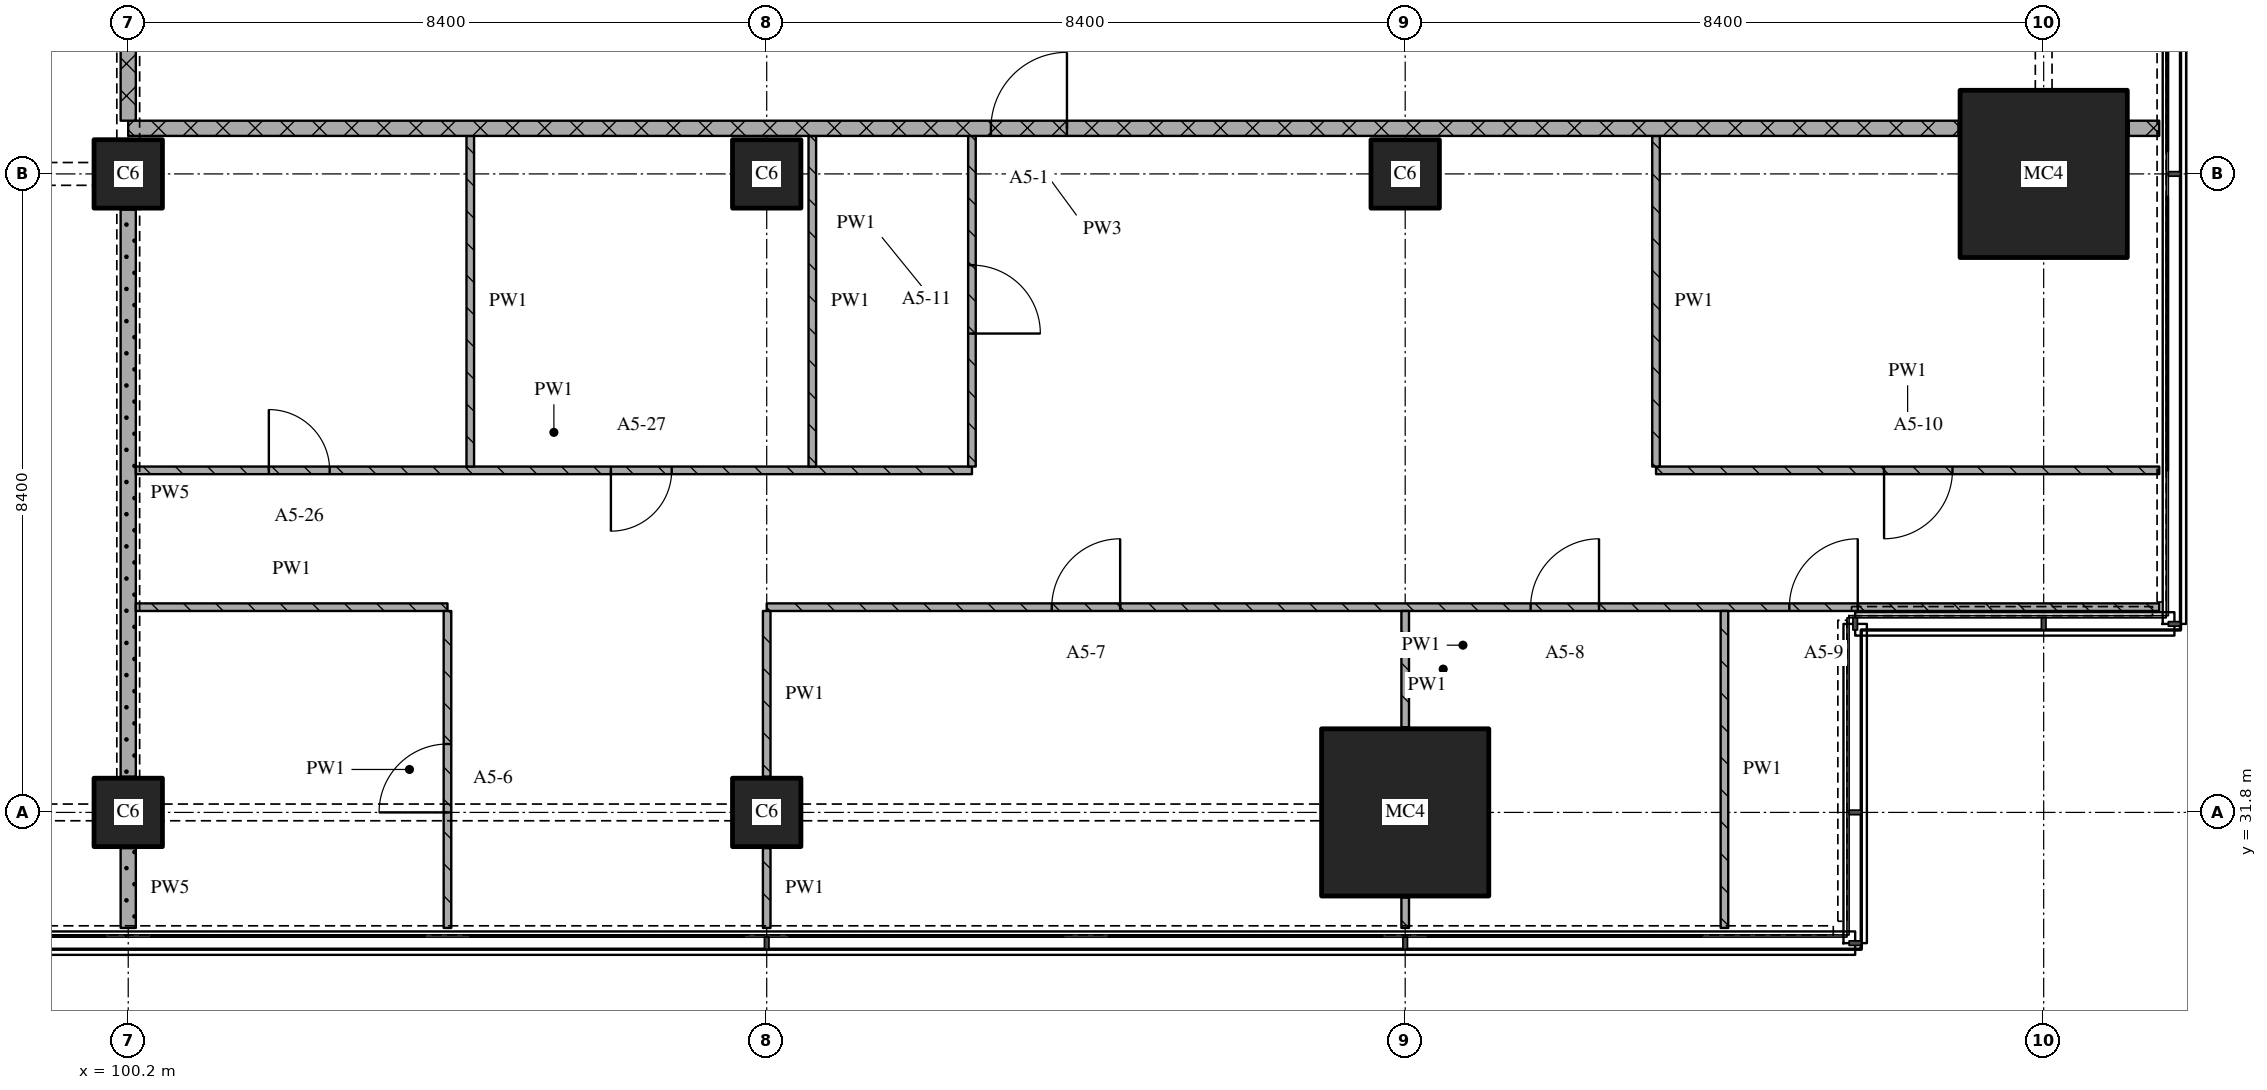
"""IFC4 building model, lengths in metres.
Left out: names, types, materials, properties, quantities, classifications, styles, units other than length and angle.
Written with IfcOpenShell. Run it as: python <this file> out.ifc"""

import sys

from ifc_helpers import new_model, si_unit, direction, frame, frame_2d, origin, origin_2d, place, context, subcontext, project, spatial, rectangle, extrude, element, fill, save


model = new_model("IFC4")
c1 = context("Model", 3, precision=1e-05, world=origin(), true_north=direction((0.0, 1.0)))
c2 = subcontext(c1, "Body", "Model", "MODEL_VIEW")
j1 = project(units=[si_unit("LENGTHUNIT", "METRE"), si_unit("PLANEANGLEUNIT", "RADIAN")], contexts=[c1])
p1 = place(None, origin())
s1 = spatial("IfcSite", under=j1, at=p1, CompositionType="ELEMENT")
p2 = place(p1, origin())
s2 = spatial("IfcBuilding", under=s1, at=p2, CompositionType="ELEMENT")
p3 = place(p2, frame((0.0, 0.0, 80.4)))
s3 = spatial("IfcBuildingStorey", under=s2, at=p3, CompositionType="ELEMENT", Elevation=80.4)
for number, where, z_axis, x_axis in (
    (1, (100.2, 31.8, 0.0), (0.0, 0.0, 1.0), (1.0, 0.0, 0.0)),
    (2, (100.2, 40.2, 0.0), (0.0, 0.0, 1.0), (1.0, 0.0, 0.0)),
    (3, (108.6, 31.8, 0.0), (0.0, 0.0, 1.0), (1.0, 0.0, 0.0)),
    (4, (108.6, 40.2, 0.0), (0.0, 0.0, 1.0), (1.0, 0.0, 0.0)),
):
    element("IfcColumn", number, at=place(p3, frame(where, z_axis=z_axis, x_axis=x_axis)), inside=s3, PredefinedType="COLUMN", context=c2, shape_type="SweptSolid", body=[
        extrude(rectangle(XDim=0.9, YDim=0.9, at=origin_2d()), origin(), (0.0, 0.0, 1.0), 3.6),
    ])
p4 = place(p3, frame((117.0, 31.8, 0.0), z_axis=(0.0, 0.0, 1.0), x_axis=(1.0, 0.0, 0.0)))
e5 = element("IfcColumn", 5, at=p4, inside=s3, PredefinedType="COLUMN", context=c2, shape_type="SweptSolid", body=[
    extrude(rectangle(XDim=2.2, YDim=2.2, at=origin_2d()), origin(), (0.0, 0.0, 1.0), 3.6),
])
p5 = place(p3, frame((117.0, 40.2, 0.0), z_axis=(0.0, 0.0, 1.0), x_axis=(1.0, 0.0, 0.0)))
e6 = element("IfcColumn", 6, at=p5, inside=s3, PredefinedType="COLUMN", context=c2, shape_type="SweptSolid", body=[
    extrude(rectangle(XDim=0.9, YDim=0.9, at=origin_2d()), origin(), (0.0, 0.0, 1.0), 3.6),
])
p6 = place(p3, frame((125.4, 40.2, 0.0), z_axis=(0.0, 0.0, 1.0), x_axis=(1.0, 0.0, 0.0)))
e7 = element("IfcColumn", 7, at=p6, inside=s3, PredefinedType="COLUMN", context=c2, shape_type="SweptSolid", body=[
    extrude(rectangle(XDim=2.2, YDim=2.2, at=origin_2d()), origin(), (0.0, 0.0, 1.0), 3.6),
])
p7 = place(p3, frame((100.3, 34.5, 0.0), z_axis=(0.0, 0.0, 1.0), x_axis=(1.0, 0.0, 0.0)))
e8 = element("IfcWall", 8, at=p7, inside=s3, PredefinedType="PARTITIONING", context=c2, shape_type="SweptSolid", body=[
    extrude(rectangle(XDim=4.1, YDim=0.1, at=frame_2d((2.05, 0.0))), origin(), (0.0, 0.0, 1.0), 3.3),
])
p8 = place(p3, frame((126.92, 34.5, 0.0), z_axis=(0.0, 0.0, 1.0), x_axis=(-1.0, 0.0, 0.0)))
e9 = element("IfcWall", 9, at=p8, inside=s3, PredefinedType="PARTITIONING", context=c2, shape_type="SweptSolid", body=[
    extrude(rectangle(XDim=18.32, YDim=0.1, at=frame_2d((9.16, 0.0))), origin(), (0.0, 0.0, 1.0), 3.3),
])
p9 = place(p8, frame((3.966, 0.0, 0.0)))
e10 = element("IfcOpeningElement", 10, at=p9, cuts=e9, PredefinedType="OPENING", context=c2, shape_type="SweptSolid", body=[
    extrude(rectangle(XDim=0.9, YDim=2.1, at=frame_2d((0.45, 1.05))), frame((0.0, 0.06, 0.0), z_axis=(0.0, -1.0, 0.0), x_axis=(1.0, 0.0, 0.0)), (0.0, 0.0, 1.0), 0.12),
])
p10 = place(p8, frame((7.37, 0.0, 0.0)))
e11 = element("IfcOpeningElement", 11, at=p10, cuts=e9, PredefinedType="OPENING", context=c2, shape_type="SweptSolid", body=[
    extrude(rectangle(XDim=0.9, YDim=2.1, at=frame_2d((0.45, 1.05))), frame((0.0, 0.06, 0.0), z_axis=(0.0, -1.0, 0.0), x_axis=(1.0, 0.0, 0.0)), (0.0, 0.0, 1.0), 0.12),
])
p11 = place(p8, frame((13.67, 0.0, 0.0)))
e12 = element("IfcOpeningElement", 12, at=p11, cuts=e9, PredefinedType="OPENING", context=c2, shape_type="SweptSolid", body=[
    extrude(rectangle(XDim=0.9, YDim=2.1, at=frame_2d((0.45, 1.05))), frame((0.0, 0.06, 0.0), z_axis=(0.0, -1.0, 0.0), x_axis=(1.0, 0.0, 0.0)), (0.0, 0.0, 1.0), 0.12),
])
p12 = place(p3, frame((100.3, 36.3, 0.0), z_axis=(0.0, 0.0, 1.0), x_axis=(1.0, 0.0, 0.0)))
e13 = element("IfcWall", 13, at=p12, inside=s3, PredefinedType="PARTITIONING", context=c2, shape_type="SweptSolid", body=[
    extrude(rectangle(XDim=11.0, YDim=0.1, at=frame_2d((5.5, 0.0))), origin(), (0.0, 0.0, 1.0), 3.3),
])
p13 = place(p12, frame((1.75, 0.0, 0.0)))
e14 = element("IfcOpeningElement", 14, at=p13, cuts=e13, PredefinedType="OPENING", context=c2, shape_type="SweptSolid", body=[
    extrude(rectangle(XDim=0.8, YDim=2.1, at=frame_2d((0.4, 1.05))), frame((0.0, 0.06, 0.0), z_axis=(0.0, -1.0, 0.0), x_axis=(1.0, 0.0, 0.0)), (0.0, 0.0, 1.0), 0.12),
])
p14 = place(p12, frame((6.25, 0.0, 0.0)))
e15 = element("IfcOpeningElement", 15, at=p14, cuts=e13, PredefinedType="OPENING", context=c2, shape_type="SweptSolid", body=[
    extrude(rectangle(XDim=0.8, YDim=2.1, at=frame_2d((0.4, 1.05))), frame((0.0, 0.06, 0.0), z_axis=(0.0, -1.0, 0.0), x_axis=(1.0, 0.0, 0.0)), (0.0, 0.0, 1.0), 0.12),
])
p15 = place(p3, frame((120.3, 36.3, 0.0), z_axis=(0.0, 0.0, 1.0), x_axis=(1.0, 0.0, 0.0)))
e16 = element("IfcWall", 16, at=p15, inside=s3, PredefinedType="PARTITIONING", context=c2, shape_type="SweptSolid", body=[
    extrude(rectangle(XDim=6.62, YDim=0.1, at=frame_2d((3.31, 0.0))), origin(), (0.0, 0.0, 1.0), 3.3),
])
p16 = place(p15, frame((3.0, 0.0, 0.0)))
e17 = element("IfcOpeningElement", 17, at=p16, cuts=e16, PredefinedType="OPENING", context=c2, shape_type="SweptSolid", body=[
    extrude(rectangle(XDim=0.9, YDim=2.1, at=frame_2d((0.45, 1.05))), frame((0.0, 0.06, 0.0), z_axis=(0.0, -1.0, 0.0), x_axis=(1.0, 0.0, 0.0)), (0.0, 0.0, 1.0), 0.12),
])
p17 = place(p3, frame((124.28, 40.8, 0.0), z_axis=(0.0, 0.0, 1.0), x_axis=(-1.0, 0.0, 0.0)))
e18 = element("IfcWall", 18, at=p17, inside=s3, PredefinedType="PARTITIONING", context=c2, shape_type="SweptSolid", body=[
    extrude(rectangle(XDim=24.08, YDim=0.2, at=frame_2d((12.04, 0.0))), origin(), (0.0, 0.0, 1.0), 3.3),
])
p18 = place(p17, frame((11.73, 0.0, 0.0)))
e19 = element("IfcOpeningElement", 19, at=p18, cuts=e18, PredefinedType="OPENING", context=c2, shape_type="SweptSolid", body=[
    extrude(rectangle(XDim=1.0, YDim=2.1, at=frame_2d((0.5, 1.05))), frame((0.0, 0.11, 0.0), z_axis=(0.0, -1.0, 0.0), x_axis=(1.0, 0.0, 0.0)), (0.0, 0.0, 1.0), 0.22),
])
p19 = place(p3, frame((126.52, 40.8, 0.0), z_axis=(0.0, 0.0, 1.0), x_axis=(1.0, 0.0, 0.0)))
e20 = element("IfcWall", 20, at=p19, inside=s3, PredefinedType="PARTITIONING", context=c2, shape_type="SweptSolid", body=[
    extrude(rectangle(XDim=0.4, YDim=0.2, at=frame_2d((0.2, 0.0))), origin(), (0.0, 0.0, 1.0), 3.3),
])
p20 = place(p3, frame((100.2, 43.1, 0.0), z_axis=(0.0, 0.0, 1.0), x_axis=(0.0, -1.0, 0.0)))
e21 = element("IfcWall", 21, at=p20, inside=s3, PredefinedType="PARTITIONING", context=c2, shape_type="SweptSolid", body=[
    extrude(rectangle(XDim=2.2, YDim=0.2, at=frame_2d((1.1, 0.0))), origin(), (0.0, 0.0, 1.0), 2.41),
])
p21 = place(p3, frame((100.2, 31.33, 0.0), z_axis=(0.0, 0.0, 1.0), x_axis=(0.0, -1.0, 0.0)))
e22 = element("IfcWall", 22, at=p21, inside=s3, PredefinedType="PARTITIONING", context=c2, shape_type="SweptSolid", body=[
    extrude(rectangle(XDim=1.05, YDim=0.2, at=frame_2d((0.525, 0.0))), origin(), (0.0, 0.0, 1.0), 2.41),
])
p22 = place(p3, frame((100.2, 39.73, 0.0), z_axis=(0.0, 0.0, 1.0), x_axis=(0.0, -1.0, 0.0)))
e23 = element("IfcWall", 23, at=p22, inside=s3, PredefinedType="PARTITIONING", context=c2, shape_type="SweptSolid", body=[
    extrude(rectangle(XDim=7.46, YDim=0.2, at=frame_2d((3.73, 0.0))), origin(), (0.0, 0.0, 1.0), 2.81),
])
p23 = place(p3, frame((104.4, 30.28, 0.0), z_axis=(0.0, 0.0, 1.0), x_axis=(0.0, 1.0, 0.0)))
e24 = element("IfcWall", 24, at=p23, inside=s3, PredefinedType="PARTITIONING", context=c2, shape_type="SweptSolid", body=[
    extrude(rectangle(XDim=4.17, YDim=0.1, at=frame_2d((2.085, 0.0))), origin(), (0.0, 0.0, 1.0), 3.3),
])
p24 = place(p23, frame((1.52, 0.0, 0.0)))
e25 = element("IfcOpeningElement", 25, at=p24, cuts=e24, PredefinedType="OPENING", context=c2, shape_type="SweptSolid", body=[
    extrude(rectangle(XDim=0.9, YDim=2.1, at=frame_2d((0.45, 1.05))), frame((0.0, 0.06, 0.0), z_axis=(0.0, -1.0, 0.0), x_axis=(1.0, 0.0, 0.0)), (0.0, 0.0, 1.0), 0.12),
])
p25 = place(p3, frame((104.7, 40.7, 0.0), z_axis=(0.0, 0.0, 1.0), x_axis=(0.0, -1.0, 0.0)))
e26 = element("IfcWall", 26, at=p25, inside=s3, PredefinedType="PARTITIONING", context=c2, shape_type="SweptSolid", body=[
    extrude(rectangle(XDim=4.35, YDim=0.1, at=frame_2d((2.175, 0.0))), origin(), (0.0, 0.0, 1.0), 3.3),
])
p26 = place(p3, frame((108.6, 31.33, 0.0), z_axis=(0.0, 0.0, 1.0), x_axis=(0.0, -1.0, 0.0)))
e27 = element("IfcWall", 27, at=p26, inside=s3, PredefinedType="PARTITIONING", context=c2, shape_type="SweptSolid", body=[
    extrude(rectangle(XDim=1.05, YDim=0.1, at=frame_2d((0.525, 0.0))), origin(), (0.0, 0.0, 1.0), 3.3),
])
p27 = place(p3, frame((108.6, 34.45, 0.0), z_axis=(0.0, 0.0, 1.0), x_axis=(0.0, -1.0, 0.0)))
e28 = element("IfcWall", 28, at=p27, inside=s3, PredefinedType="PARTITIONING", context=c2, shape_type="SweptSolid", body=[
    extrude(rectangle(XDim=2.18, YDim=0.1, at=frame_2d((1.09, 0.0))), origin(), (0.0, 0.0, 1.0), 3.3),
])
p28 = place(p3, frame((109.2, 40.7, 0.0), z_axis=(0.0, 0.0, 1.0), x_axis=(0.0, -1.0, 0.0)))
e29 = element("IfcWall", 29, at=p28, inside=s3, PredefinedType="PARTITIONING", context=c2, shape_type="SweptSolid", body=[
    extrude(rectangle(XDim=4.35, YDim=0.1, at=frame_2d((2.175, 0.0))), origin(), (0.0, 0.0, 1.0), 3.3),
])
p29 = place(p3, frame((111.3, 36.35, 0.0), z_axis=(0.0, 0.0, 1.0), x_axis=(0.0, 1.0, 0.0)))
e30 = element("IfcWall", 30, at=p29, inside=s3, PredefinedType="PARTITIONING", context=c2, shape_type="SweptSolid", body=[
    extrude(rectangle(XDim=4.35, YDim=0.1, at=frame_2d((2.175, 0.0))), origin(), (0.0, 0.0, 1.0), 3.3),
])
p30 = place(p29, frame((1.75, 0.0, 0.0)))
e31 = element("IfcOpeningElement", 31, at=p30, cuts=e30, PredefinedType="OPENING", context=c2, shape_type="SweptSolid", body=[
    extrude(rectangle(XDim=0.9, YDim=2.1, at=frame_2d((0.45, 1.05))), frame((0.0, 0.06, 0.0), z_axis=(0.0, -1.0, 0.0), x_axis=(1.0, 0.0, 0.0)), (0.0, 0.0, 1.0), 0.12),
])
p31 = place(p3, frame((117.0, 30.68, 0.0), z_axis=(0.0, 0.0, 1.0), x_axis=(0.0, -1.0, 0.0)))
e32 = element("IfcWall", 32, at=p31, inside=s3, PredefinedType="PARTITIONING", context=c2, shape_type="SweptSolid", body=[
    extrude(rectangle(XDim=0.4, YDim=0.1, at=frame_2d((0.2, 0.0))), origin(), (0.0, 0.0, 1.0), 3.3),
])
p32 = place(p3, frame((117.0, 34.45, 0.0), z_axis=(0.0, 0.0, 1.0), x_axis=(0.0, -1.0, 0.0)))
e33 = element("IfcWall", 33, at=p32, inside=s3, PredefinedType="PARTITIONING", context=c2, shape_type="SweptSolid", body=[
    extrude(rectangle(XDim=1.53, YDim=0.1, at=frame_2d((0.765, 0.0))), origin(), (0.0, 0.0, 1.0), 3.3),
])
p33 = place(p3, frame((120.3, 40.7, 0.0), z_axis=(0.0, 0.0, 1.0), x_axis=(0.0, -1.0, 0.0)))
e34 = element("IfcWall", 34, at=p33, inside=s3, PredefinedType="PARTITIONING", context=c2, shape_type="SweptSolid", body=[
    extrude(rectangle(XDim=4.35, YDim=0.1, at=frame_2d((2.175, 0.0))), origin(), (0.0, 0.0, 1.0), 3.3),
])
p34 = place(p3, frame((121.2, 34.45, 0.0), z_axis=(0.0, 0.0, 1.0), x_axis=(0.0, -1.0, 0.0)))
e35 = element("IfcWall", 35, at=p34, inside=s3, PredefinedType="PARTITIONING", context=c2, shape_type="SweptSolid", body=[
    extrude(rectangle(XDim=4.17, YDim=0.1, at=frame_2d((2.085, 0.0))), origin(), (0.0, 0.0, 1.0), 3.3),
])
p35 = place(p9, origin())
e36 = element("IfcDoor", 36, at=p35, inside=s3, OperationType="SINGLE_SWING_RIGHT", PredefinedType="DOOR", context=c2, shape_type="SweptSolid", body=[
    extrude(rectangle(XDim=0.9, YDim=2.1, at=frame_2d((0.45, 1.05))), frame((0.0, 0.025, 0.0), z_axis=(0.0, -1.0, 0.0), x_axis=(1.0, 0.0, 0.0)), (0.0, 0.0, 1.0), 0.05),
])
fill(e10, e36)
p36 = place(p10, origin())
e37 = element("IfcDoor", 37, at=p36, inside=s3, OperationType="SINGLE_SWING_RIGHT", PredefinedType="DOOR", context=c2, shape_type="SweptSolid", body=[
    extrude(rectangle(XDim=0.9, YDim=2.1, at=frame_2d((0.45, 1.05))), frame((0.0, 0.025, 0.0), z_axis=(0.0, -1.0, 0.0), x_axis=(1.0, 0.0, 0.0)), (0.0, 0.0, 1.0), 0.05),
])
fill(e11, e37)
p37 = place(p11, origin())
e38 = element("IfcDoor", 38, at=p37, inside=s3, OperationType="SINGLE_SWING_RIGHT", PredefinedType="DOOR", context=c2, shape_type="SweptSolid", body=[
    extrude(rectangle(XDim=0.9, YDim=2.1, at=frame_2d((0.45, 1.05))), frame((0.0, 0.025, 0.0), z_axis=(0.0, -1.0, 0.0), x_axis=(1.0, 0.0, 0.0)), (0.0, 0.0, 1.0), 0.05),
])
fill(e12, e38)
p38 = place(p13, origin())
e39 = element("IfcDoor", 39, at=p38, inside=s3, OperationType="SINGLE_SWING_LEFT", PredefinedType="DOOR", context=c2, shape_type="SweptSolid", body=[
    extrude(rectangle(XDim=0.8, YDim=2.1, at=frame_2d((0.4, 1.05))), frame((0.0, 0.025, 0.0), z_axis=(0.0, -1.0, 0.0), x_axis=(1.0, 0.0, 0.0)), (0.0, 0.0, 1.0), 0.05),
])
fill(e14, e39)
p39 = place(p14, origin())
e40 = element("IfcDoor", 40, at=p39, inside=s3, OperationType="SINGLE_SWING_RIGHT", PredefinedType="DOOR", context=c2, shape_type="SweptSolid", body=[
    extrude(rectangle(XDim=0.8, YDim=2.1, at=frame_2d((0.4, 1.05))), frame((0.0, 0.025, 0.0), z_axis=(0.0, -1.0, 0.0), x_axis=(1.0, 0.0, 0.0)), (0.0, 0.0, 1.0), 0.05),
])
fill(e15, e40)
p40 = place(p16, origin())
e41 = element("IfcDoor", 41, at=p40, inside=s3, OperationType="SINGLE_SWING_RIGHT", PredefinedType="DOOR", context=c2, shape_type="SweptSolid", body=[
    extrude(rectangle(XDim=0.9, YDim=2.1, at=frame_2d((0.45, 1.05))), frame((0.0, 0.025, 0.0), z_axis=(0.0, -1.0, 0.0), x_axis=(1.0, 0.0, 0.0)), (0.0, 0.0, 1.0), 0.05),
])
fill(e17, e41)
p41 = place(p18, origin())
e42 = element("IfcDoor", 42, at=p41, inside=s3, OperationType="SINGLE_SWING_RIGHT", PredefinedType="DOOR", context=c2, shape_type="SweptSolid", body=[
    extrude(rectangle(XDim=1.0, YDim=2.1, at=frame_2d((0.5, 1.05))), frame((0.0, 0.025, 0.0), z_axis=(0.0, -1.0, 0.0), x_axis=(1.0, 0.0, 0.0)), (0.0, 0.0, 1.0), 0.05),
])
fill(e19, e42)
p42 = place(p24, origin())
e43 = element("IfcDoor", 43, at=p42, inside=s3, OperationType="SINGLE_SWING_LEFT", PredefinedType="DOOR", context=c2, shape_type="SweptSolid", body=[
    extrude(rectangle(XDim=0.9, YDim=2.1, at=frame_2d((0.45, 1.05))), frame((0.0, 0.025, 0.0), z_axis=(0.0, -1.0, 0.0), x_axis=(1.0, 0.0, 0.0)), (0.0, 0.0, 1.0), 0.05),
])
fill(e25, e43)
p43 = place(p30, origin())
e44 = element("IfcDoor", 44, at=p43, inside=s3, OperationType="SINGLE_SWING_RIGHT", PredefinedType="DOOR", context=c2, shape_type="SweptSolid", body=[
    extrude(rectangle(XDim=0.9, YDim=2.1, at=frame_2d((0.45, 1.05))), frame((0.0, 0.025, 0.0), z_axis=(0.0, -1.0, 0.0), x_axis=(1.0, 0.0, 0.0)), (0.0, 0.0, 1.0), 0.05),
])
fill(e31, e44)
save(model, sys.argv[1])
